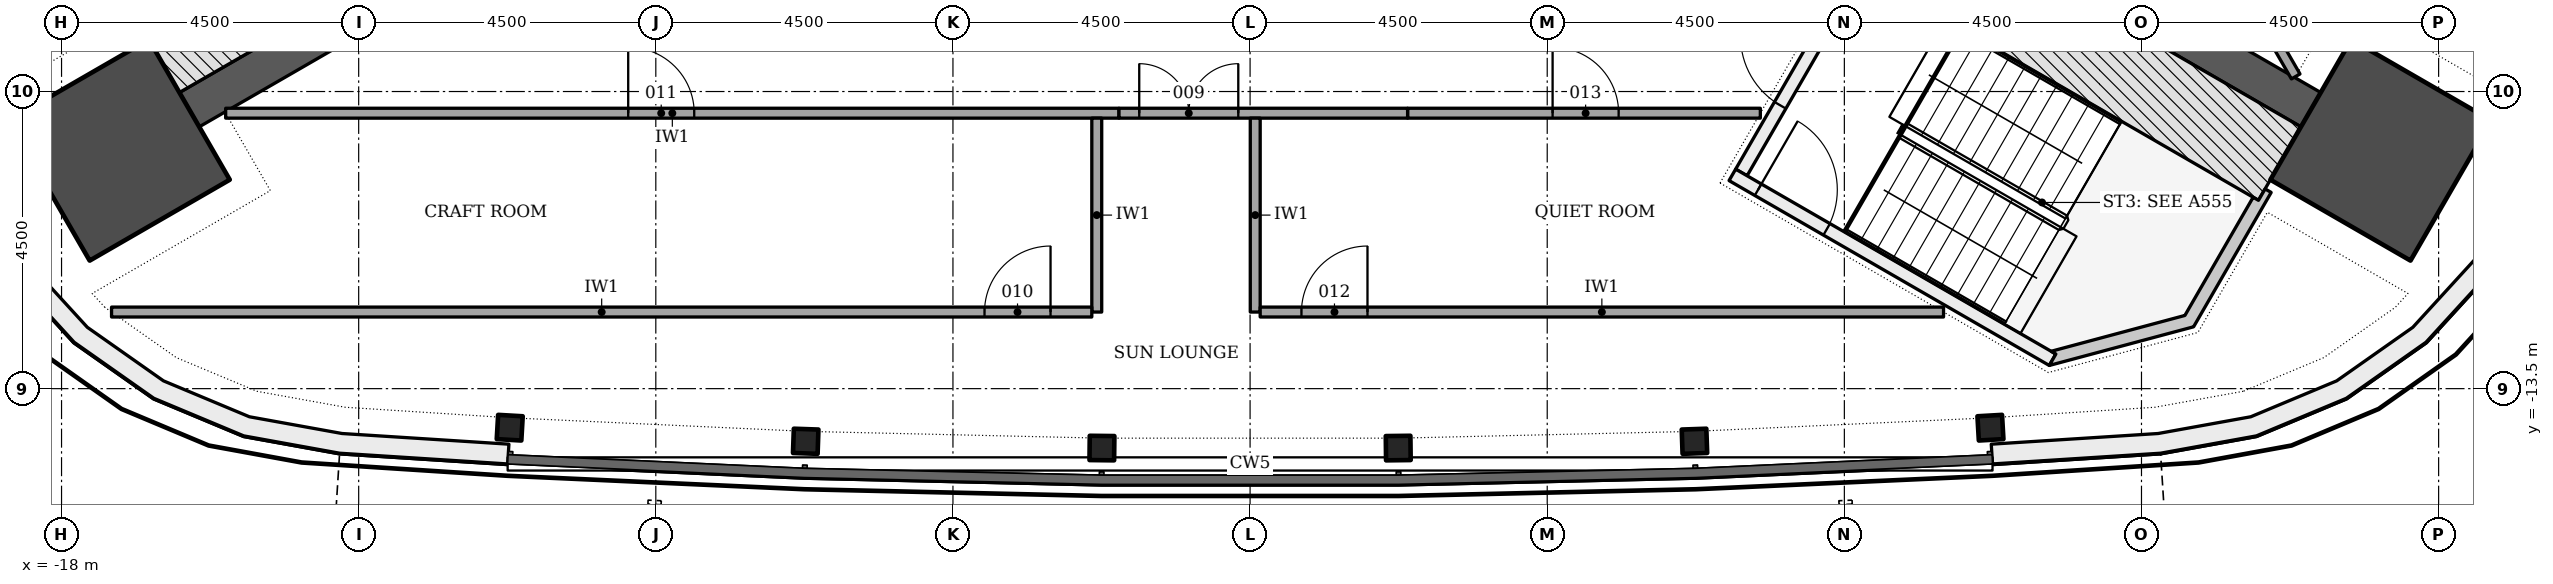
"""IFC4 building model, lengths in metres.
Left out: names, types, materials, properties, quantities, classifications, styles, units other than length and angle.
Written with IfcOpenShell. Run it as: python <this file> out.ifc"""

import sys

from ifc_helpers import new_model, si_unit, direction, frame, frame_2d, origin, origin_2d, place, context, subcontext, project, spatial, polyline, rectangle, i_section, outline, extrude, element, fill, save


model = new_model("IFC4")
c1 = context("Model", 3, precision=1e-05, world=origin(), true_north=direction((0.0, 1.0)))
c2 = subcontext(c1, "Body", "Model", "MODEL_VIEW")
j1 = project(units=[si_unit("LENGTHUNIT", "METRE"), si_unit("PLANEANGLEUNIT", "RADIAN")], contexts=[c1])
p1 = place(None, origin())
s1 = spatial("IfcSite", under=j1, at=p1, CompositionType="ELEMENT")
p2 = place(p1, origin())
s2 = spatial("IfcBuilding", under=s1, at=p2, CompositionType="ELEMENT")
p3 = place(p2, frame((0.0, 0.0, 240.0)))
s3 = spatial("IfcBuildingStorey", under=s2, at=p3, CompositionType="ELEMENT", Elevation=240.0)
for number, where, z_axis, x_axis in (
    (1, (-9.922, -5.728, -0.2), (0.0, 0.0, 1.0), (-0.866, -0.5, 0.0)),
    (2, (9.922, -5.728, -0.2), (0.0, 0.0, 1.0), (0.866, -0.5, 0.0)),
):
    element("IfcWall", number, at=place(p3, frame(where, z_axis=z_axis, x_axis=x_axis)), inside=s3, PredefinedType="SHEAR", context=c2, shape_type="SweptSolid", body=[
        extrude(rectangle(XDim=7.093, YDim=0.6, at=frame_2d((3.547, 0.0))), origin(), (0.0, 0.0, 1.0), 3.6),
    ])
for number, where, z_axis, x_axis in (
    (3, (-17.126, -9.887, -0.2), (0.0, 0.0, 1.0), (-0.866, -0.5, 0.0)),
    (4, (17.126, -9.887, -0.2), (0.0, 0.0, 1.0), (0.866, -0.5, 0.0)),
):
    element("IfcColumn", number, at=place(p3, frame(where, z_axis=z_axis, x_axis=x_axis)), inside=s3, PredefinedType="COLUMN", context=c2, shape_type="SweptSolid", body=[
        extrude(rectangle(XDim=2.45, YDim=2.45, at=origin_2d()), origin(), (0.0, 0.0, 1.0), 3.6),
    ])
for number, where, z_axis, x_axis in (
    (5, (-11.212, -14.092, -0.2), (0.0, 0.0, 1.0), (0.998, -0.057, 0.0)),
    (6, (-6.73, -14.297, -0.2), (0.0, 0.0, 1.0), (0.999, -0.034, 0.0)),
    (7, (-2.244, -14.4, -0.2), (0.0, 0.0, 1.0), (1.0, -0.011, 0.0)),
    (8, (2.244, -14.4, -0.2), (0.0, 0.0, 1.0), (1.0, 0.011, 0.0)),
    (9, (6.73, -14.297, -0.2), (0.0, 0.0, 1.0), (0.999, 0.034, 0.0)),
    (10, (11.212, -14.092, -0.2), (0.0, 0.0, 1.0), (0.998, 0.057, 0.0)),
):
    element("IfcColumn", number, at=place(p3, frame(where, z_axis=z_axis, x_axis=x_axis)), inside=s3, PredefinedType="COLUMN", context=c2, shape_type="SweptSolid", body=[
        extrude(i_section(OverallWidth=0.373, OverallDepth=0.368, WebThickness=0.015, FlangeThickness=0.024, FilletRadius=0.015, at=origin_2d()), origin(), (0.0, 0.0, 1.0), 3.6),
    ])
p4 = place(p3, origin())
e11 = element("IfcWall", 11, at=p4, inside=s3, PredefinedType="NOTDEFINED", context=c2, shape_type="SweptSolid", body=[
    extrude(outline(polyline([(-18.301, -2.417), (-19.433, -4.702), (-19.931, -6.091), (-20.119, -7.555), (-19.987, -9.024), (-19.542, -10.431), (-18.804, -11.708), (-17.809, -12.798), (-16.602, -13.646), (-15.241, -14.215), (-13.789, -14.478), (-11.244, -14.641), (-11.225, -14.341), (-13.752, -14.18), (-15.155, -13.926), (-16.456, -13.382), (-17.609, -12.571), (-18.561, -11.53), (-19.266, -10.309), (-19.691, -8.965), (-19.817, -7.56), (-19.638, -6.162), (-19.156, -4.82), (-18.032, -2.55), (-18.301, -2.417)])), origin(), (0.0, 0.0, 1.0), 3.3),
])
p5 = place(p3, origin())
e12 = element("IfcWall", 12, at=p5, inside=s3, PredefinedType="NOTDEFINED", context=c2, shape_type="SweptSolid", body=[
    extrude(outline(polyline([(11.244, -14.641), (13.789, -14.478), (15.241, -14.215), (16.602, -13.646), (17.809, -12.798), (18.804, -11.708), (19.542, -10.431), (19.987, -9.024), (20.119, -7.555), (19.931, -6.091), (19.433, -4.702), (18.301, -2.417), (18.032, -2.55), (19.156, -4.82), (19.638, -6.162), (19.817, -7.56), (19.691, -8.965), (19.266, -10.309), (18.561, -11.53), (17.609, -12.571), (16.456, -13.382), (15.155, -13.926), (13.752, -14.18), (11.225, -14.341), (11.244, -14.641)])), origin(), (0.0, 0.0, 1.0), 3.3),
])
p6 = place(p3, frame((-10.393, -4.912, -0.2), z_axis=(0.0, 0.0, 1.0), x_axis=(-0.866023389271, -0.500003489223, 0.0)))
e13 = element("IfcWall", 13, at=p6, inside=s3, PredefinedType="SHEAR", context=c2, shape_type="SweptSolid", body=[
    extrude(rectangle(XDim=7.094, YDim=1.286, at=frame_2d((3.547, 0.0))), origin(), (0.0, 0.0, 1.0), 3.6),
])
p7 = place(p3, frame((7.44, -10.226, -0.2), z_axis=(0.0, 0.0, 1.0), x_axis=(0.500022077904, 0.866012656725, 0.0)))
e14 = element("IfcWall", 14, at=p7, inside=s3, PredefinedType="SHEAR", context=c2, shape_type="SweptSolid", body=[
    extrude(rectangle(XDim=3.55, YDim=0.2, at=frame_2d((1.775, 0.0))), origin(), (0.0, 0.0, 1.0), 3.6),
])
p8 = place(p7, frame((1.175, 0.0, 0.2)))
e15 = element("IfcOpeningElement", 15, at=p8, cuts=e14, PredefinedType="OPENING", context=c2, shape_type="SweptSolid", body=[
    extrude(rectangle(XDim=1.2, YDim=2.1, at=frame_2d((0.6, 1.05))), frame((0.0, 0.11, 0.0), z_axis=(0.0, -1.0, 0.0), x_axis=(1.0, 0.0, 0.0)), (0.0, 0.0, 1.0), 0.22),
])
p9 = place(p3, frame((7.304, -10.262, -0.2), z_axis=(0.0, 0.0, 1.0), x_axis=(0.866026594901, -0.49999793692, 0.0)))
e16 = element("IfcWall", 16, at=p9, inside=s3, PredefinedType="SHEAR", context=c2, shape_type="SweptSolid", body=[
    extrude(rectangle(XDim=5.6, YDim=0.2, at=frame_2d((2.8, 0.0))), origin(), (0.0, 0.0, 1.0), 3.6),
])
p10 = place(p9, frame((0.45, 0.0, 0.2)))
e17 = element("IfcOpeningElement", 17, at=p10, cuts=e16, PredefinedType="OPENING", context=c2, shape_type="SweptSolid", body=[
    extrude(rectangle(XDim=1.2, YDim=2.1, at=frame_2d((0.6, 1.05))), frame((0.0, 0.11, 0.0), z_axis=(0.0, -1.0, 0.0), x_axis=(1.0, 0.0, 0.0)), (0.0, 0.0, 1.0), 0.22),
])
p11 = place(p3, frame((9.45, -6.545, -0.2), z_axis=(0.0, 0.0, 1.0), x_axis=(0.866023389271, -0.500003489223, 0.0)))
e18 = element("IfcWall", 18, at=p11, inside=s3, PredefinedType="SHEAR", context=c2, shape_type="SweptSolid", body=[
    extrude(rectangle(XDim=7.094, YDim=1.286, at=frame_2d((3.547, 0.0))), origin(), (0.0, 0.0, 1.0), 3.6),
])
p12 = place(p3, frame((0.0, 0.0, -0.2)))
e19 = element("IfcWall", 19, at=p12, inside=s3, PredefinedType="SHEAR", context=c2, shape_type="SweptSolid", body=[
    extrude(outline(polyline([(12.104, -13.149), (14.289, -12.563), (15.464, -10.528), (15.372, -10.475), (15.272, -10.648), (15.272, -10.648), (15.272, -10.648), (15.272, -10.648), (15.272, -10.648), (15.272, -10.648), (15.272, -10.648), (15.272, -10.648), (15.272, -10.648), (15.272, -10.648), (15.272, -10.648), (15.272, -10.648), (15.272, -10.648), (15.272, -10.648), (15.272, -10.648), (15.272, -10.648), (15.272, -10.648), (15.191, -10.601), (14.157, -12.392), (12.132, -12.934), (12.204, -12.976), (12.204, -12.976), (12.204, -12.976), (12.204, -12.976), (12.204, -12.976), (12.204, -12.976), (12.204, -12.976), (12.204, -12.976), (12.204, -12.976), (12.204, -12.976), (12.204, -12.976), (12.204, -12.976), (12.204, -12.976), (12.204, -12.976), (12.204, -12.976), (12.204, -12.976), (12.204, -12.976), (12.104, -13.149)])), origin(), (0.0, 0.0, 1.0), 3.6),
])
p13 = place(p3, frame((15.836, -8.772, 0.0), z_axis=(0.0, 0.0, 1.0), x_axis=(-0.500001479768, 0.866024549438, 0.0)))
e20 = element("IfcWall", 20, at=p13, inside=s3, PredefinedType="PARTITIONING", context=c2, shape_type="SweptSolid", body=[
    extrude(rectangle(XDim=17.9, YDim=0.15, at=frame_2d((8.95, 0.0))), origin(), (0.0, 0.0, 1.0), 2.852),
])
p14 = place(p13, frame((2.973, 0.0, 0.0)))
e21 = element("IfcOpeningElement", 21, at=p14, cuts=e20, PredefinedType="OPENING", context=c2, shape_type="SweptSolid", body=[
    extrude(rectangle(XDim=1.0, YDim=2.1, at=frame_2d((0.5, 1.05))), frame((0.0, 0.085, 0.0), z_axis=(0.0, -1.0, 0.0), x_axis=(1.0, 0.0, 0.0)), (0.0, 0.0, 1.0), 0.17),
])
p15 = place(p13, frame((11.837, 0.0, 0.0)))
e22 = element("IfcOpeningElement", 22, at=p15, cuts=e20, PredefinedType="OPENING", context=c2, shape_type="SweptSolid", body=[
    extrude(rectangle(XDim=1.0, YDim=2.1, at=frame_2d((0.5, 1.05))), frame((0.0, 0.085, 0.0), z_axis=(0.0, -1.0, 0.0), x_axis=(1.0, 0.0, 0.0)), (0.0, 0.0, 1.0), 0.17),
])
p16 = place(p3, frame((-15.514, -9.328, 0.0), z_axis=(0.0, 0.0, 1.0), x_axis=(1.0, 0.0, 0.0)))
e23 = element("IfcWall", 23, at=p16, inside=s3, PredefinedType="PARTITIONING", context=c2, shape_type="SweptSolid", body=[
    extrude(rectangle(XDim=13.529, YDim=0.15, at=frame_2d((6.764, 0.0))), origin(), (0.0, 0.0, 1.0), 2.852),
])
p17 = place(p16, frame((6.096, 0.0, 0.0)))
e24 = element("IfcOpeningElement", 24, at=p17, cuts=e23, PredefinedType="OPENING", context=c2, shape_type="SweptSolid", body=[
    extrude(rectangle(XDim=1.0, YDim=2.1, at=frame_2d((0.5, 1.05))), frame((0.0, 0.085, 0.0), z_axis=(0.0, -1.0, 0.0), x_axis=(1.0, 0.0, 0.0)), (0.0, 0.0, 1.0), 0.17),
])
p18 = place(p3, frame((2.385, -9.328, 0.0), z_axis=(0.0, 0.0, 1.0), x_axis=(1.0, 0.0, 0.0)))
e25 = element("IfcWall", 25, at=p18, inside=s3, PredefinedType="PARTITIONING", context=c2, shape_type="SweptSolid", body=[
    extrude(rectangle(XDim=5.342, YDim=0.15, at=frame_2d((2.671, 0.0))), origin(), (0.0, 0.0, 1.0), 2.852),
])
p19 = place(p18, frame((2.196, 0.0, 0.0)))
e26 = element("IfcOpeningElement", 26, at=p19, cuts=e25, PredefinedType="OPENING", context=c2, shape_type="SweptSolid", body=[
    extrude(rectangle(XDim=1.0, YDim=2.1, at=frame_2d((0.5, 1.05))), frame((0.0, 0.085, 0.0), z_axis=(0.0, -1.0, 0.0), x_axis=(1.0, 0.0, 0.0)), (0.0, 0.0, 1.0), 0.17),
])
p20 = place(p3, frame((-1.986, -9.328, 0.0), z_axis=(0.0, 0.0, 1.0), x_axis=(1.0, 0.0, 0.0)))
e27 = element("IfcWall", 27, at=p20, inside=s3, PredefinedType="PARTITIONING", context=c2, shape_type="SweptSolid", body=[
    extrude(rectangle(XDim=4.371, YDim=0.15, at=frame_2d((2.186, 0.0))), origin(), (0.0, 0.0, 1.0), 2.852),
])
p21 = place(p20, frame((0.307, 0.0, 0.0)))
e28 = element("IfcOpeningElement", 28, at=p21, cuts=e27, PredefinedType="OPENING", context=c2, shape_type="SweptSolid", body=[
    extrude(rectangle(XDim=1.5, YDim=2.1, at=frame_2d((0.75, 1.05))), frame((0.0, 0.085, 0.0), z_axis=(0.0, -1.0, 0.0), x_axis=(1.0, 0.0, 0.0)), (0.0, 0.0, 1.0), 0.17),
])
p22 = place(p3, frame((-2.322, -9.403, 0.0), z_axis=(0.0, 0.0, 1.0), x_axis=(0.0, -1.0, 0.0)))
e29 = element("IfcWall", 29, at=p22, inside=s3, PredefinedType="PARTITIONING", context=c2, shape_type="SweptSolid", body=[
    extrude(rectangle(XDim=2.937, YDim=0.15, at=frame_2d((1.468, 0.0))), origin(), (0.0, 0.0, 1.0), 2.852),
])
p23 = place(p3, frame((0.078, -9.403, 0.0), z_axis=(0.0, 0.0, 1.0), x_axis=(0.0, -1.0, 0.0)))
e30 = element("IfcWall", 30, at=p23, inside=s3, PredefinedType="PARTITIONING", context=c2, shape_type="SweptSolid", body=[
    extrude(rectangle(XDim=2.937, YDim=0.15, at=frame_2d((1.468, 0.0))), origin(), (0.0, 0.0, 1.0), 3.4),
])
p24 = place(p3, frame((-17.243, -12.34, 0.0), z_axis=(0.0, 0.0, 1.0), x_axis=(1.0, 0.0, 0.0)))
e31 = element("IfcWall", 31, at=p24, inside=s3, PredefinedType="PARTITIONING", context=c2, shape_type="SweptSolid", body=[
    extrude(rectangle(XDim=14.846, YDim=0.15, at=frame_2d((7.423, 0.0))), origin(), (0.0, 0.0, 1.0), 2.852),
])
p25 = place(p24, frame((13.221, 0.0, 0.0)))
e32 = element("IfcOpeningElement", 32, at=p25, cuts=e31, PredefinedType="OPENING", context=c2, shape_type="SweptSolid", body=[
    extrude(rectangle(XDim=1.0, YDim=2.1, at=frame_2d((0.5, 1.05))), frame((0.0, 0.085, 0.0), z_axis=(0.0, -1.0, 0.0), x_axis=(1.0, 0.0, 0.0)), (0.0, 0.0, 1.0), 0.17),
])
p26 = place(p3, frame((0.153, -12.34, 0.0), z_axis=(0.0, 0.0, 1.0), x_axis=(1.0, 0.0, 0.0)))
e33 = element("IfcWall", 33, at=p26, inside=s3, PredefinedType="PARTITIONING", context=c2, shape_type="SweptSolid", body=[
    extrude(rectangle(XDim=10.349, YDim=0.15, at=frame_2d((5.175, 0.0))), origin(), (0.0, 0.0, 1.0), 2.852),
])
p27 = place(p26, frame((0.625, 0.0, 0.0)))
e34 = element("IfcOpeningElement", 34, at=p27, cuts=e33, PredefinedType="OPENING", context=c2, shape_type="SweptSolid", body=[
    extrude(rectangle(XDim=1.0, YDim=2.1, at=frame_2d((0.5, 1.05))), frame((0.0, 0.085, 0.0), z_axis=(0.0, -1.0, 0.0), x_axis=(1.0, 0.0, 0.0)), (0.0, 0.0, 1.0), 0.17),
])
p28 = place(p8, origin())
e35 = element("IfcDoor", 35, at=p28, inside=s3, OperationType="SINGLE_SWING_RIGHT", PredefinedType="DOOR", context=c2, shape_type="SweptSolid", body=[
    extrude(rectangle(XDim=1.2, YDim=2.1, at=frame_2d((0.6, 1.05))), frame((0.0, 0.025, 0.0), z_axis=(0.0, -1.0, 0.0), x_axis=(1.0, 0.0, 0.0)), (0.0, 0.0, 1.0), 0.05),
])
fill(e15, e35)
p29 = place(p10, origin())
e36 = element("IfcDoor", 36, at=p29, inside=s3, OperationType="SINGLE_SWING_LEFT", PredefinedType="DOOR", context=c2, shape_type="SweptSolid", body=[
    extrude(rectangle(XDim=1.2, YDim=2.1, at=frame_2d((0.6, 1.05))), frame((0.0, 0.025, 0.0), z_axis=(0.0, -1.0, 0.0), x_axis=(1.0, 0.0, 0.0)), (0.0, 0.0, 1.0), 0.05),
])
fill(e17, e36)
p30 = place(p21, origin())
e37 = element("IfcDoor", 37, at=p30, inside=s3, OperationType="DOUBLE_DOOR_SINGLE_SWING", PredefinedType="DOOR", context=c2, shape_type="SweptSolid", body=[
    extrude(rectangle(XDim=1.5, YDim=2.1, at=frame_2d((0.75, 1.05))), frame((0.0, 0.025, 0.0), z_axis=(0.0, -1.0, 0.0), x_axis=(1.0, 0.0, 0.0)), (0.0, 0.0, 1.0), 0.05),
])
fill(e28, e37)
p31 = place(p25, origin())
e38 = element("IfcDoor", 38, at=p31, inside=s3, OperationType="SINGLE_SWING_RIGHT", PredefinedType="DOOR", context=c2, shape_type="SweptSolid", body=[
    extrude(rectangle(XDim=1.0, YDim=2.1, at=frame_2d((0.5, 1.05))), frame((0.0, 0.025, 0.0), z_axis=(0.0, -1.0, 0.0), x_axis=(1.0, 0.0, 0.0)), (0.0, 0.0, 1.0), 0.05),
])
fill(e32, e38)
p32 = place(p17, origin())
e39 = element("IfcDoor", 39, at=p32, inside=s3, OperationType="SINGLE_SWING_LEFT", PredefinedType="DOOR", context=c2, shape_type="SweptSolid", body=[
    extrude(rectangle(XDim=1.0, YDim=2.1, at=frame_2d((0.5, 1.05))), frame((0.0, 0.025, 0.0), z_axis=(0.0, -1.0, 0.0), x_axis=(1.0, 0.0, 0.0)), (0.0, 0.0, 1.0), 0.05),
])
fill(e24, e39)
p33 = place(p27, origin())
e40 = element("IfcDoor", 40, at=p33, inside=s3, OperationType="SINGLE_SWING_RIGHT", PredefinedType="DOOR", context=c2, shape_type="SweptSolid", body=[
    extrude(rectangle(XDim=1.0, YDim=2.1, at=frame_2d((0.5, 1.05))), frame((0.0, 0.025, 0.0), z_axis=(0.0, -1.0, 0.0), x_axis=(1.0, 0.0, 0.0)), (0.0, 0.0, 1.0), 0.05),
])
fill(e34, e40)
p34 = place(p19, origin())
e41 = element("IfcDoor", 41, at=p34, inside=s3, OperationType="SINGLE_SWING_LEFT", PredefinedType="DOOR", context=c2, shape_type="SweptSolid", body=[
    extrude(rectangle(XDim=1.0, YDim=2.1, at=frame_2d((0.5, 1.05))), frame((0.0, 0.025, 0.0), z_axis=(0.0, -1.0, 0.0), x_axis=(1.0, 0.0, 0.0)), (0.0, 0.0, 1.0), 0.05),
])
fill(e26, e41)
save(model, sys.argv[1])
